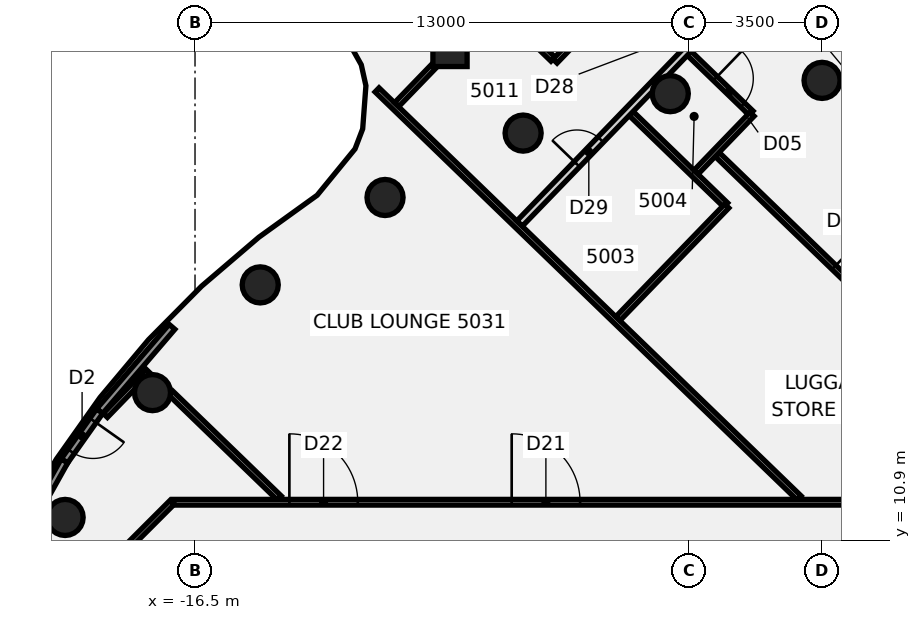
"""IFC4 building model, lengths in metres.
Left out: names, types, materials, properties, quantities, classifications, styles, units other than length and angle.
Written with IfcOpenShell. Run it as: python <this file> out.ifc"""

import sys

from ifc_helpers import new_model, si_unit, direction, frame, frame_2d, origin, origin_2d, place, context, subcontext, project, spatial, rectangle, circle, extrude, element, fill, save


model = new_model("IFC4")
c1 = context("Model", 3, precision=1e-05, world=origin(), true_north=direction((0.0, 1.0)))
c2 = subcontext(c1, "Body", "Model", "MODEL_VIEW")
j1 = project(units=[si_unit("LENGTHUNIT", "METRE"), si_unit("PLANEANGLEUNIT", "RADIAN")], contexts=[c1])
p1 = place(None, origin())
s1 = spatial("IfcSite", under=j1, at=p1, CompositionType="ELEMENT")
p2 = place(p1, origin())
s2 = spatial("IfcBuilding", under=s1, at=p2, CompositionType="ELEMENT")
p3 = place(p2, frame((0.0, 0.0, 200.5)))
s3 = spatial("IfcBuildingStorey", under=s2, at=p3, CompositionType="ELEMENT", Elevation=200.5)
for number, where, z_axis, x_axis in (
    (1, (0.0, 23.0, -0.14), (0.0, 0.0, 1.0), (1.0, 0.0, 0.0)),
    (2, (-3.994, 22.651, -0.14), (0.0, 0.0, 1.0), (1.0, 0.0, 0.0)),
    (3, (-7.866, 21.613, -0.14), (0.0, 0.0, 1.0), (1.0, 0.0, 0.0)),
    (4, (-11.5, 19.919, -0.14), (0.0, 0.0, 1.0), (1.0, 0.0, 0.0)),
    (5, (-14.784, 17.619, -0.14), (0.0, 0.0, 1.0), (1.0, 0.0, 0.0)),
    (6, (-17.619, 14.784, -0.14), (0.0, 0.0, 1.0), (1.0, 0.0, 0.0)),
    (7, (-19.919, 11.5, -0.14), (0.0, 0.0, 1.0), (1.0, 0.0, 0.0)),
):
    element("IfcColumn", number, at=place(p3, frame(where, z_axis=z_axis, x_axis=x_axis)), inside=s3, PredefinedType="COLUMN", context=c2, shape_type="SweptSolid", body=[
        extrude(circle(Radius=0.475, at=origin_2d()), origin(), (0.0, 0.0, 1.0), 3.6),
    ])
p4 = place(p3, frame((-9.79, 23.814, -0.139), z_axis=(-0.008743548797, -0.049614555965, 0.998730166857), x_axis=(0.695071309744, 0.717728105829, 0.041740154219)))
e8 = element("IfcColumn", 8, at=p4, inside=s3, PredefinedType="COLUMN", context=c2, shape_type="SweptSolid", body=[
    extrude(rectangle(XDim=0.9, YDim=0.9, at=origin_2d()), origin(), (0.0, 0.0, 1.0), 3.602),
])
p5 = place(p3, frame((-17.137, 14.771, 0.0), z_axis=(0.0, 0.0, 1.0), x_axis=(0.719023191533, -0.694986079025, 0.0)))
e9 = element("IfcWall", 9, at=p5, inside=s3, PredefinedType="PARTITIONING", context=c2, shape_type="SweptSolid", body=[
    extrude(rectangle(XDim=3.971, YDim=0.15, at=frame_2d((1.986, 0.0))), origin(), (0.0, 0.0, 1.0), 2.864),
])
p6 = place(p3, frame((-11.71, 22.75, 0.0), z_axis=(0.0, 0.0, 1.0), x_axis=(0.718952314135, -0.695059400339, 0.0)))
e10 = element("IfcWall", 10, at=p6, inside=s3, PredefinedType="PARTITIONING", context=c2, shape_type="SweptSolid", body=[
    extrude(rectangle(XDim=15.45, YDim=0.15, at=frame_2d((7.725, 0.0))), origin(), (0.0, 0.0, 1.0), 2.864),
])
p7 = place(p3, frame((-10.161, 26.538, 0.0), z_axis=(0.0, 0.0, 1.0), x_axis=(0.718829873251, -0.695186027852, 0.0)))
e11 = element("IfcWall", 11, at=p7, inside=s3, PredefinedType="PARTITIONING", context=c2, shape_type="SweptSolid", body=[
    extrude(rectangle(XDim=4.285, YDim=0.15, at=frame_2d((2.143, 0.0))), origin(), (0.0, 0.0, 1.0), 2.864),
])
p8 = place(p3, frame((-9.979, 29.977, 0.0), z_axis=(0.0, 0.0, 1.0), x_axis=(0.719187723666, -0.694815815975, 0.0)))
e12 = element("IfcWall", 12, at=p8, inside=s3, PredefinedType="PARTITIONING", context=c2, shape_type="SweptSolid", body=[
    extrude(rectangle(XDim=11.28, YDim=0.15, at=frame_2d((5.64, 0.0))), origin(), (0.0, 0.0, 1.0), 2.864),
])
p9 = place(p8, frame((9.97, 0.0, 0.0)))
e13 = element("IfcOpeningElement", 13, at=p9, cuts=e12, PredefinedType="OPENING", context=c2, shape_type="SweptSolid", body=[
    extrude(rectangle(XDim=1.0, YDim=2.1, at=frame_2d((0.5, 1.05))), frame((0.0, 0.085, 0.0), z_axis=(0.0, -1.0, 0.0), x_axis=(1.0, 0.0, 0.0)), (0.0, 0.0, 1.0), 0.17),
])
p10 = place(p8, frame((7.519, 0.0, 0.0)))
e14 = element("IfcOpeningElement", 14, at=p10, cuts=e12, PredefinedType="OPENING", context=c2, shape_type="SweptSolid", body=[
    extrude(rectangle(XDim=0.9, YDim=2.1, at=frame_2d((0.45, 1.05))), frame((0.0, 0.085, 0.0), z_axis=(0.0, -1.0, 0.0), x_axis=(1.0, 0.0, 0.0)), (0.0, 0.0, 1.0), 0.17),
])
p11 = place(p8, frame((0.82, 0.0, 0.0)))
e15 = element("IfcOpeningElement", 15, at=p11, cuts=e12, PredefinedType="OPENING", context=c2, shape_type="SweptSolid", body=[
    extrude(rectangle(XDim=0.9, YDim=2.1, at=frame_2d((0.45, 1.05))), frame((0.0, 0.085, 0.0), z_axis=(0.0, -1.0, 0.0), x_axis=(1.0, 0.0, 0.0)), (0.0, 0.0, 1.0), 0.17),
])
p12 = place(p3, frame((-5.023, 22.127, 0.0), z_axis=(0.0, 0.0, 1.0), x_axis=(0.718790912946, -0.695226310971, 0.0)))
e16 = element("IfcWall", 16, at=p12, inside=s3, PredefinedType="PARTITIONING", context=c2, shape_type="SweptSolid", body=[
    extrude(rectangle(XDim=3.46, YDim=0.15, at=frame_2d((1.73, 0.0))), origin(), (0.0, 0.0, 1.0), 2.864),
])
p13 = place(p3, frame((-2.757, 21.048, 0.0), z_axis=(0.0, 0.0, 1.0), x_axis=(0.718984622922, -0.695025979371, 0.0)))
e17 = element("IfcWall", 17, at=p13, inside=s3, PredefinedType="PARTITIONING", context=c2, shape_type="SweptSolid", body=[
    extrude(rectangle(XDim=13.002, YDim=0.15, at=frame_2d((6.501, 0.0))), origin(), (0.0, 0.0, 1.0), 2.864),
])
p14 = place(p13, frame((4.27, 0.0, 0.0)))
e18 = element("IfcOpeningElement", 18, at=p14, cuts=e17, PredefinedType="OPENING", context=c2, shape_type="SweptSolid", body=[
    extrude(rectangle(XDim=0.9, YDim=2.1, at=frame_2d((0.45, 1.05))), frame((0.0, 0.085, 0.0), z_axis=(0.0, -1.0, 0.0), x_axis=(1.0, 0.0, 0.0)), (0.0, 0.0, 1.0), 0.17),
])
p15 = place(p3, frame((-17.065, 11.9, 0.0), z_axis=(0.0, 0.0, 1.0), x_axis=(1.0, 0.0, 0.0)))
e19 = element("IfcWall", 19, at=p15, inside=s3, PredefinedType="PARTITIONING", context=c2, shape_type="SweptSolid", body=[
    extrude(rectangle(XDim=34.165, YDim=0.15, at=frame_2d((17.083, 0.0))), origin(), (0.0, 0.0, 1.0), 2.864),
])
p16 = place(p15, frame((24.372, 0.0, 0.0)))
e20 = element("IfcOpeningElement", 20, at=p16, cuts=e19, PredefinedType="OPENING", context=c2, shape_type="SweptSolid", body=[
    extrude(rectangle(XDim=1.8, YDim=2.1, at=frame_2d((0.9, 1.05))), frame((0.0, 0.085, 0.0), z_axis=(0.0, -1.0, 0.0), x_axis=(1.0, 0.0, 0.0)), (0.0, 0.0, 1.0), 0.17),
])
p17 = place(p15, frame((8.898, 0.0, 0.0)))
e21 = element("IfcOpeningElement", 21, at=p17, cuts=e19, PredefinedType="OPENING", context=c2, shape_type="SweptSolid", body=[
    extrude(rectangle(XDim=1.8, YDim=2.1, at=frame_2d((0.9, 1.05))), frame((0.0, 0.085, 0.0), z_axis=(0.0, -1.0, 0.0), x_axis=(1.0, 0.0, 0.0)), (0.0, 0.0, 1.0), 0.17),
])
p18 = place(p15, frame((3.048, 0.0, 0.0)))
e22 = element("IfcOpeningElement", 22, at=p18, cuts=e19, PredefinedType="OPENING", context=c2, shape_type="SweptSolid", body=[
    extrude(rectangle(XDim=1.8, YDim=2.1, at=frame_2d((0.9, 1.05))), frame((0.0, 0.085, 0.0), z_axis=(0.0, -1.0, 0.0), x_axis=(1.0, 0.0, 0.0)), (0.0, 0.0, 1.0), 0.17),
])
p19 = place(p3, frame((-18.872, 10.128, 0.0), z_axis=(0.0, 0.0, 1.0), x_axis=(0.707106781187, 0.707106781187, 0.0)))
e23 = element("IfcWall", 23, at=p19, inside=s3, PredefinedType="PARTITIONING", context=c2, shape_type="SweptSolid", body=[
    extrude(rectangle(XDim=2.505, YDim=0.15, at=frame_2d((1.253, 0.0))), origin(), (0.0, 0.0, 1.0), 2.864),
])
p20 = place(p3, frame((-18.859, 14.184, 0.0), z_axis=(0.0, 0.0, 1.0), x_axis=(0.695170193183, 0.718845186747, 0.0)))
e24 = element("IfcWall", 24, at=p20, inside=s3, PredefinedType="PARTITIONING", context=c2, shape_type="SweptSolid", body=[
    extrude(rectangle(XDim=1.619, YDim=0.15, at=frame_2d((0.81, 0.0))), origin(), (0.0, 0.0, 1.0), 2.864),
])
p21 = place(p3, frame((-11.194, 22.362, 0.0), z_axis=(0.0, 0.0, 1.0), x_axis=(0.69492396257, 0.71908322623, 0.0)))
e25 = element("IfcWall", 25, at=p21, inside=s3, PredefinedType="PARTITIONING", context=c2, shape_type="SweptSolid", body=[
    extrude(rectangle(XDim=1.415, YDim=0.15, at=frame_2d((0.708, 0.0))), origin(), (0.0, 0.0, 1.0), 2.864),
])
p22 = place(p3, frame((-7.958, 19.235, 0.0), z_axis=(0.0, 0.0, 1.0), x_axis=(0.694993988342, 0.719015546542, 0.0)))
e26 = element("IfcWall", 26, at=p22, inside=s3, PredefinedType="PARTITIONING", context=c2, shape_type="SweptSolid", body=[
    extrude(rectangle(XDim=14.219, YDim=0.2, at=frame_2d((7.109, 0.0))), origin(), (0.0, 0.0, 1.0), 2.864),
])
p23 = place(p22, frame((6.619, 0.0, 0.0)))
e27 = element("IfcOpeningElement", 27, at=p23, cuts=e26, PredefinedType="OPENING", context=c2, shape_type="SweptSolid", body=[
    extrude(rectangle(XDim=1.4, YDim=2.1, at=frame_2d((0.7, 1.05))), frame((0.0, 0.11, 0.0), z_axis=(0.0, -1.0, 0.0), x_axis=(1.0, 0.0, 0.0)), (0.0, 0.0, 1.0), 0.22),
])
p24 = place(p22, frame((2.17, 0.0, 0.0)))
e28 = element("IfcOpeningElement", 28, at=p24, cuts=e26, PredefinedType="OPENING", context=c2, shape_type="SweptSolid", body=[
    extrude(rectangle(XDim=0.9, YDim=2.1, at=frame_2d((0.45, 1.05))), frame((0.0, 0.11, 0.0), z_axis=(0.0, -1.0, 0.0), x_axis=(1.0, 0.0, 0.0)), (0.0, 0.0, 1.0), 0.22),
])
p25 = place(p3, frame((-7.027, 23.507, 0.0), z_axis=(0.0, 0.0, 1.0), x_axis=(0.694895234989, 0.719110987532, 0.0)))
e29 = element("IfcWall", 29, at=p25, inside=s3, PredefinedType="PARTITIONING", context=c2, shape_type="SweptSolid", body=[
    extrude(rectangle(XDim=2.521, YDim=0.15, at=frame_2d((1.26, 0.0))), origin(), (0.0, 0.0, 1.0), 2.864),
])
p26 = place(p25, frame((0.6, 0.0, 0.0)))
e30 = element("IfcOpeningElement", 30, at=p26, cuts=e29, PredefinedType="OPENING", context=c2, shape_type="SweptSolid", body=[
    extrude(rectangle(XDim=0.9, YDim=2.1, at=frame_2d((0.45, 1.05))), frame((0.0, 0.085, 0.0), z_axis=(0.0, -1.0, 0.0), x_axis=(1.0, 0.0, 0.0)), (0.0, 0.0, 1.0), 0.17),
])
p27 = place(p3, frame((-5.37, 16.732, 0.0), z_axis=(0.0, 0.0, 1.0), x_axis=(0.695063966074, 0.718947900106, 0.0)))
e31 = element("IfcWall", 31, at=p27, inside=s3, PredefinedType="PARTITIONING", context=c2, shape_type="SweptSolid", body=[
    extrude(rectangle(XDim=4.119, YDim=0.15, at=frame_2d((2.06, 0.0))), origin(), (0.0, 0.0, 1.0), 2.864),
])
p28 = place(p3, frame((-3.314, 20.586, 0.0), z_axis=(0.0, 0.0, 1.0), x_axis=(0.694502029341, 0.719490744375, 0.0)))
e32 = element("IfcWall", 32, at=p28, inside=s3, PredefinedType="PARTITIONING", context=c2, shape_type="SweptSolid", body=[
    extrude(rectangle(XDim=2.12, YDim=0.15, at=frame_2d((1.06, 0.0))), origin(), (0.0, 0.0, 1.0), 2.864),
])
p29 = place(p3, frame((-17.106, 16.516, 0.0), z_axis=(0.0, 0.0, 1.0), x_axis=(-0.651107622301, -0.758985417635, 0.0)))
e33 = element("IfcWall", 33, at=p29, inside=s3, PredefinedType="SOLIDWALL", context=c2, shape_type="SweptSolid", body=[
    extrude(rectangle(XDim=2.924, YDim=0.2, at=frame_2d((1.462, 0.0))), origin(), (0.0, 0.0, 1.0), 3.46),
])
p30 = place(p3, frame((-19.934, 12.99, 0.0), z_axis=(0.0, 0.0, 1.0), x_axis=(-0.488305904859, -0.872672529234, 0.0)))
e34 = element("IfcWall", 34, at=p30, inside=s3, PredefinedType="SOLIDWALL", context=c2, shape_type="SweptSolid", body=[
    extrude(rectangle(XDim=2.924, YDim=0.2, at=frame_2d((1.462, 0.0))), origin(), (0.0, 0.0, 1.0), 3.46),
])
p31 = place(p3, frame((-19.01, 14.296, 0.0), z_axis=(0.0, 0.0, 1.0), x_axis=(-0.577623490405, -0.816303315767, 0.0)))
e35 = element("IfcWall", 35, at=p31, inside=s3, PredefinedType="SOLIDWALL", context=c2, shape_type="SweptSolid", body=[
    extrude(rectangle(XDim=1.6, YDim=0.2, at=frame_2d((0.8, 0.0))), origin(), (0.0, 0.0, 1.0), 3.46),
])
p32 = place(p31, frame((0.3, 0.0, 0.0)))
e36 = element("IfcOpeningElement", 36, at=p32, cuts=e35, PredefinedType="OPENING", context=c2, shape_type="SweptSolid", body=[
    extrude(rectangle(XDim=1.0, YDim=2.4, at=frame_2d((0.5, 1.2))), frame((0.0, 0.11, 0.0), z_axis=(0.0, -1.0, 0.0), x_axis=(1.0, 0.0, 0.0)), (0.0, 0.0, 1.0), 0.22),
])
p33 = place(p9, frame((1.0, 0.0, 0.0), z_axis=(0.0, 0.0, 1.0), x_axis=(-1.0, 0.0, 0.0)))
e37 = element("IfcDoor", 37, at=p33, inside=s3, OperationType="SINGLE_SWING_RIGHT", PredefinedType="DOOR", context=c2, shape_type="SweptSolid", body=[
    extrude(rectangle(XDim=1.0, YDim=2.1, at=frame_2d((0.5, 1.05))), frame((0.0, 0.025, 0.0), z_axis=(0.0, -1.0, 0.0), x_axis=(1.0, 0.0, 0.0)), (0.0, 0.0, 1.0), 0.05),
])
fill(e13, e37)
p34 = place(p14, frame((0.9, 0.0, 0.0), z_axis=(0.0, 0.0, 1.0), x_axis=(-1.0, 0.0, 0.0)))
e38 = element("IfcDoor", 38, at=p34, inside=s3, OperationType="SINGLE_SWING_LEFT", PredefinedType="DOOR", context=c2, shape_type="SweptSolid", body=[
    extrude(rectangle(XDim=0.9, YDim=2.1, at=frame_2d((0.45, 1.05))), frame((0.0, 0.025, 0.0), z_axis=(0.0, -1.0, 0.0), x_axis=(1.0, 0.0, 0.0)), (0.0, 0.0, 1.0), 0.05),
])
fill(e18, e38)
p35 = place(p17, origin())
e39 = element("IfcDoor", 39, at=p35, inside=s3, OperationType="DOUBLE_DOOR_SINGLE_SWING", PredefinedType="DOOR", context=c2, shape_type="SweptSolid", body=[
    extrude(rectangle(XDim=1.8, YDim=2.1, at=frame_2d((0.9, 1.05))), frame((0.0, 0.025, 0.0), z_axis=(0.0, -1.0, 0.0), x_axis=(1.0, 0.0, 0.0)), (0.0, 0.0, 1.0), 0.05),
])
fill(e21, e39)
p36 = place(p18, origin())
e40 = element("IfcDoor", 40, at=p36, inside=s3, OperationType="DOUBLE_DOOR_SINGLE_SWING", PredefinedType="DOOR", context=c2, shape_type="SweptSolid", body=[
    extrude(rectangle(XDim=1.8, YDim=2.1, at=frame_2d((0.9, 1.05))), frame((0.0, 0.025, 0.0), z_axis=(0.0, -1.0, 0.0), x_axis=(1.0, 0.0, 0.0)), (0.0, 0.0, 1.0), 0.05),
])
fill(e22, e40)
p37 = place(p24, frame((0.9, 0.0, 0.0), z_axis=(0.0, 0.0, 1.0), x_axis=(-1.0, 0.0, 0.0)))
e41 = element("IfcDoor", 41, at=p37, inside=s3, OperationType="SINGLE_SWING_LEFT", PredefinedType="DOOR", context=c2, shape_type="SweptSolid", body=[
    extrude(rectangle(XDim=0.9, YDim=2.1, at=frame_2d((0.45, 1.05))), frame((0.0, 0.025, 0.0), z_axis=(0.0, -1.0, 0.0), x_axis=(1.0, 0.0, 0.0)), (0.0, 0.0, 1.0), 0.05),
])
fill(e28, e41)
p38 = place(p32, origin())
e42 = element("IfcDoor", 42, at=p38, inside=s3, OperationType="SINGLE_SWING_LEFT", PredefinedType="DOOR", context=c2, shape_type="SweptSolid", body=[
    extrude(rectangle(XDim=1.0, YDim=2.4, at=frame_2d((0.5, 1.2))), frame((0.0, 0.025, 0.0), z_axis=(0.0, -1.0, 0.0), x_axis=(1.0, 0.0, 0.0)), (0.0, 0.0, 1.0), 0.05),
])
fill(e36, e42)
save(model, sys.argv[1])
